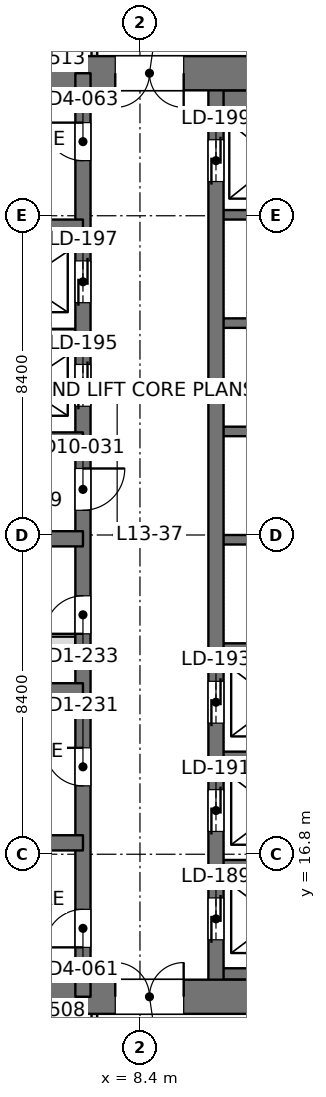
"""IFC4 building model, lengths in metres.
Left out: names, types, materials, properties, quantities, classifications, styles, units other than length and angle.
Written with IfcOpenShell. Run it as: python <this file> out.ifc"""

import sys

from ifc_helpers import new_model, si_unit, direction, frame, frame_2d, origin, place, context, subcontext, project, spatial, rectangle, extrude, element, fill, save


model = new_model("IFC4")
c1 = context("Model", 3, precision=1e-05, world=origin(), true_north=direction((0.0, 1.0)))
c2 = subcontext(c1, "Body", "Model", "MODEL_VIEW")
j1 = project(units=[si_unit("LENGTHUNIT", "METRE"), si_unit("PLANEANGLEUNIT", "RADIAN")], contexts=[c1])
p1 = place(None, origin())
s1 = spatial("IfcSite", under=j1, at=p1, CompositionType="ELEMENT")
p2 = place(p1, origin())
s2 = spatial("IfcBuilding", under=s1, at=p2, CompositionType="ELEMENT")
p3 = place(p2, frame((0.0, 0.0, 59.4)))
s3 = spatial("IfcBuildingStorey", under=s2, at=p3, CompositionType="ELEMENT", Elevation=59.4)
p4 = place(p3, frame((-1.2, 13.05, 0.0), z_axis=(0.0, 0.0, 1.0), x_axis=(1.0, 0.0, 0.0)))
e1 = element("IfcWall", 1, at=p4, inside=s3, PredefinedType="SHEAR", context=c2, shape_type="SweptSolid", body=[
    extrude(rectangle(XDim=18.0, YDim=0.9, at=frame_2d((9.0, 0.0))), origin(), (0.0, 0.0, 1.0), 4.5),
])
p5 = place(p4, frame((8.95, 0.0, 0.0)))
e2 = element("IfcOpeningElement", 2, at=p5, cuts=e1, PredefinedType="OPENING", context=c2, shape_type="SweptSolid", body=[
    extrude(rectangle(XDim=1.8, YDim=2.4, at=frame_2d((0.9, 1.2))), frame((0.0, 0.46, 0.0), z_axis=(0.0, -1.0, 0.0), x_axis=(1.0, 0.0, 0.0)), (0.0, 0.0, 1.0), 0.92),
])
p6 = place(p3, frame((-1.2, 37.35, 0.0), z_axis=(0.0, 0.0, 1.0), x_axis=(1.0, 0.0, 0.0)))
e3 = element("IfcWall", 3, at=p6, inside=s3, PredefinedType="SHEAR", context=c2, shape_type="SweptSolid", body=[
    extrude(rectangle(XDim=18.0, YDim=0.9, at=frame_2d((9.0, 0.0))), origin(), (0.0, 0.0, 1.0), 4.5),
])
p7 = place(p6, frame((8.95, 0.0, 0.0)))
e4 = element("IfcOpeningElement", 4, at=p7, cuts=e3, PredefinedType="OPENING", context=c2, shape_type="SweptSolid", body=[
    extrude(rectangle(XDim=1.8, YDim=2.4, at=frame_2d((0.9, 1.2))), frame((0.0, 0.46, 0.0), z_axis=(0.0, -1.0, 0.0), x_axis=(1.0, 0.0, 0.0)), (0.0, 0.0, 1.0), 0.92),
])
p8 = place(p3, frame((6.9, 13.05, 0.0), z_axis=(0.0, 0.0, 1.0), x_axis=(0.0, 1.0, 0.0)))
e5 = element("IfcWall", 5, at=p8, inside=s3, PredefinedType="SHEAR", context=c2, shape_type="SweptSolid", body=[
    extrude(rectangle(XDim=24.3, YDim=0.4, at=frame_2d((12.15, 0.0))), origin(), (0.0, 0.0, 1.0), 4.5),
])
p9 = place(p8, frame((1.3, 0.0, 0.0)))
e6 = element("IfcOpeningElement", 6, at=p9, cuts=e5, PredefinedType="OPENING", context=c2, shape_type="SweptSolid", body=[
    extrude(rectangle(XDim=1.0, YDim=2.2, at=frame_2d((0.5, 1.1))), frame((0.0, 0.21, 0.0), z_axis=(0.0, -1.0, 0.0), x_axis=(1.0, 0.0, 0.0)), (0.0, 0.0, 1.0), 0.42),
])
p10 = place(p8, frame((22.0, 0.0, 0.0)))
e7 = element("IfcOpeningElement", 7, at=p10, cuts=e5, PredefinedType="OPENING", context=c2, shape_type="SweptSolid", body=[
    extrude(rectangle(XDim=1.0, YDim=2.2, at=frame_2d((0.5, 1.1))), frame((0.0, 0.21, 0.0), z_axis=(0.0, -1.0, 0.0), x_axis=(1.0, 0.0, 0.0)), (0.0, 0.0, 1.0), 0.42),
])
p11 = place(p8, frame((5.55, 0.0, 0.0)))
e8 = element("IfcOpeningElement", 8, at=p11, cuts=e5, PredefinedType="OPENING", context=c2, shape_type="SweptSolid", body=[
    extrude(rectangle(XDim=1.0, YDim=2.2, at=frame_2d((0.5, 1.1))), frame((0.0, 0.21, 0.0), z_axis=(0.0, -1.0, 0.0), x_axis=(1.0, 0.0, 0.0)), (0.0, 0.0, 1.0), 0.42),
])
p12 = place(p8, frame((9.55, 0.0, 0.0)))
e9 = element("IfcOpeningElement", 9, at=p12, cuts=e5, PredefinedType="OPENING", context=c2, shape_type="SweptSolid", body=[
    extrude(rectangle(XDim=1.0, YDim=2.2, at=frame_2d((0.5, 1.1))), frame((0.0, 0.21, 0.0), z_axis=(0.0, -1.0, 0.0), x_axis=(1.0, 0.0, 0.0)), (0.0, 0.0, 1.0), 0.42),
])
p13 = place(p8, frame((12.8, 0.0, 0.0)))
e10 = element("IfcOpeningElement", 10, at=p13, cuts=e5, PredefinedType="OPENING", context=c2, shape_type="SweptSolid", body=[
    extrude(rectangle(XDim=1.1, YDim=2.2, at=frame_2d((0.55, 1.1))), frame((0.0, 0.21, 0.0), z_axis=(0.0, -1.0, 0.0), x_axis=(1.0, 0.0, 0.0)), (0.0, 0.0, 1.0), 0.42),
])
p14 = place(p8, frame((15.538, 0.0, 0.0)))
e11 = element("IfcOpeningElement", 11, at=p14, cuts=e5, PredefinedType="OPENING", context=c2, shape_type="SweptSolid", body=[
    extrude(rectangle(XDim=1.1, YDim=2.2, at=frame_2d((0.55, 1.1))), frame((0.0, 0.21, 0.0), z_axis=(0.0, -1.0, 0.0), x_axis=(1.0, 0.0, 0.0)), (0.0, 0.0, 1.0), 0.42),
])
p15 = place(p8, frame((18.262, 0.0, 0.0)))
e12 = element("IfcOpeningElement", 12, at=p15, cuts=e5, PredefinedType="OPENING", context=c2, shape_type="SweptSolid", body=[
    extrude(rectangle(XDim=1.1, YDim=2.2, at=frame_2d((0.55, 1.1))), frame((0.0, 0.21, 0.0), z_axis=(0.0, -1.0, 0.0), x_axis=(1.0, 0.0, 0.0)), (0.0, 0.0, 1.0), 0.42),
])
p16 = place(p3, frame((10.4, 13.05, 0.0), z_axis=(0.0, 0.0, 1.0), x_axis=(0.0, 1.0, 0.0)))
e13 = element("IfcWall", 13, at=p16, inside=s3, PredefinedType="SHEAR", context=c2, shape_type="SweptSolid", body=[
    extrude(rectangle(XDim=24.3, YDim=0.4, at=frame_2d((12.15, 0.0))), origin(), (0.0, 0.0, 1.0), 4.5),
])
p17 = place(p16, frame((1.5, 0.0, 0.0)))
e14 = element("IfcOpeningElement", 14, at=p17, cuts=e13, PredefinedType="OPENING", context=c2, shape_type="SweptSolid", body=[
    extrude(rectangle(XDim=1.1, YDim=2.2, at=frame_2d((0.55, 1.1))), frame((0.0, 0.21, 0.0), z_axis=(0.0, -1.0, 0.0), x_axis=(1.0, 0.0, 0.0)), (0.0, 0.0, 1.0), 0.42),
])
p18 = place(p16, frame((4.35, 0.0, 0.0)))
e15 = element("IfcOpeningElement", 15, at=p18, cuts=e13, PredefinedType="OPENING", context=c2, shape_type="SweptSolid", body=[
    extrude(rectangle(XDim=1.1, YDim=2.2, at=frame_2d((0.55, 1.1))), frame((0.0, 0.21, 0.0), z_axis=(0.0, -1.0, 0.0), x_axis=(1.0, 0.0, 0.0)), (0.0, 0.0, 1.0), 0.42),
])
p19 = place(p16, frame((7.2, 0.0, 0.0)))
e16 = element("IfcOpeningElement", 16, at=p19, cuts=e13, PredefinedType="OPENING", context=c2, shape_type="SweptSolid", body=[
    extrude(rectangle(XDim=1.1, YDim=2.2, at=frame_2d((0.55, 1.1))), frame((0.0, 0.21, 0.0), z_axis=(0.0, -1.0, 0.0), x_axis=(1.0, 0.0, 0.0)), (0.0, 0.0, 1.0), 0.42),
])
p20 = place(p16, frame((21.45, 0.0, 0.0)))
e17 = element("IfcOpeningElement", 17, at=p20, cuts=e13, PredefinedType="OPENING", context=c2, shape_type="SweptSolid", body=[
    extrude(rectangle(XDim=1.1, YDim=2.2, at=frame_2d((0.55, 1.1))), frame((0.0, 0.21, 0.0), z_axis=(0.0, -1.0, 0.0), x_axis=(1.0, 0.0, 0.0)), (0.0, 0.0, 1.0), 0.42),
])
for number, where, z_axis, x_axis in (
    (18, (-0.75, 17.1, 0.0), (0.0, 0.0, 1.0), (1.0, 0.0, 0.0)),
    (19, (-0.75, 21.1, 0.0), (0.0, 0.0, 1.0), (1.0, 0.0, 0.0)),
    (20, (-0.75, 25.1, 0.0), (0.0, 0.0, 1.0), (1.0, 0.0, 0.0)),
    (21, (-0.75, 27.7, 0.0), (0.0, 0.0, 1.0), (1.0, 0.0, 0.0)),
    (22, (-0.75, 33.3, 0.0), (0.0, 0.0, 1.0), (1.0, 0.0, 0.0)),
):
    element("IfcWall", number, at=place(p3, frame(where, z_axis=z_axis, x_axis=x_axis)), inside=s3, PredefinedType="SHEAR", context=c2, shape_type="SweptSolid", body=[
        extrude(rectangle(XDim=7.65, YDim=0.4, at=frame_2d((3.825, 0.0))), origin(), (0.0, 0.0, 1.0), 4.5),
    ])
p21 = place(p3, frame((3.7, 30.5, 0.0), z_axis=(0.0, 0.0, 1.0), x_axis=(1.0, 0.0, 0.0)))
e23 = element("IfcWall", 23, at=p21, inside=s3, PredefinedType="SHEAR", context=c2, shape_type="SweptSolid", body=[
    extrude(rectangle(XDim=3.2, YDim=0.25, at=frame_2d((1.6, 0.0))), origin(), (0.0, 0.0, 1.0), 4.5),
])
p22 = place(p3, frame((10.4, 13.65, 0.0), z_axis=(0.0, 0.0, 1.0), x_axis=(1.0, 0.0, 0.0)))
e24 = element("IfcWall", 24, at=p22, inside=s3, PredefinedType="SHEAR", context=c2, shape_type="SweptSolid", body=[
    extrude(rectangle(XDim=3.2, YDim=0.3, at=frame_2d((1.6, 0.0))), origin(), (0.0, 0.0, 1.0), 4.5),
])
for number, where, z_axis, x_axis in (
    (25, (10.4, 16.525, 0.0), (0.0, 0.0, 1.0), (1.0, 0.0, 0.0)),
    (26, (10.4, 19.375, 0.0), (0.0, 0.0, 1.0), (1.0, 0.0, 0.0)),
    (27, (10.4, 22.225, 0.0), (0.0, 0.0, 1.0), (1.0, 0.0, 0.0)),
    (28, (10.4, 25.075, 0.0), (0.0, 0.0, 1.0), (1.0, 0.0, 0.0)),
    (29, (10.4, 27.925, 0.0), (0.0, 0.0, 1.0), (1.0, 0.0, 0.0)),
    (30, (10.4, 30.775, 0.0), (0.0, 0.0, 1.0), (1.0, 0.0, 0.0)),
    (31, (10.4, 33.625, 0.0), (0.0, 0.0, 1.0), (1.0, 0.0, 0.0)),
):
    element("IfcWall", number, at=place(p3, frame(where, z_axis=z_axis, x_axis=x_axis)), inside=s3, PredefinedType="SHEAR", context=c2, shape_type="SweptSolid", body=[
        extrude(rectangle(XDim=3.2, YDim=0.25, at=frame_2d((1.6, 0.0))), origin(), (0.0, 0.0, 1.0), 4.5),
    ])
p23 = place(p3, frame((10.4, 36.625, 0.0), z_axis=(0.0, 0.0, 1.0), x_axis=(1.0, 0.0, 0.0)))
e32 = element("IfcWall", 32, at=p23, inside=s3, PredefinedType="SHEAR", context=c2, shape_type="SweptSolid", body=[
    extrude(rectangle(XDim=3.2, YDim=0.55, at=frame_2d((1.6, 0.0))), origin(), (0.0, 0.0, 1.0), 4.5),
])
p24 = place(p3, frame((7.2, 10.474, 0.0), z_axis=(0.0, 0.0, 1.0), x_axis=(0.0, 1.0, 0.0)))
e33 = element("IfcWall", 33, at=p24, inside=s3, PredefinedType="PARTITIONING", context=c2, shape_type="SweptSolid", body=[
    extrude(rectangle(XDim=2.128, YDim=0.15, at=frame_2d((1.064, 0.0))), origin(), (0.0, 0.0, 1.0), 4.34),
])
p25 = place(p24, frame((0.526, 0.0, 0.0)))
e34 = element("IfcOpeningElement", 34, at=p25, cuts=e33, PredefinedType="OPENING", context=c2, shape_type="SweptSolid", body=[
    extrude(rectangle(XDim=1.0, YDim=2.2, at=frame_2d((0.5, 1.1))), frame((0.0, 0.085, 0.0), z_axis=(0.0, -1.0, 0.0), x_axis=(1.0, 0.0, 0.0)), (0.0, 0.0, 1.0), 0.17),
])
p26 = place(p3, frame((7.2, 37.8, 0.0), z_axis=(0.0, 0.0, 1.0), x_axis=(0.0, 1.0, 0.0)))
e35 = element("IfcWall", 35, at=p26, inside=s3, PredefinedType="PARTITIONING", context=c2, shape_type="SweptSolid", body=[
    extrude(rectangle(XDim=2.126, YDim=0.15, at=frame_2d((1.063, 0.0))), origin(), (0.0, 0.0, 1.0), 4.34),
])
p27 = place(p26, frame((0.6, 0.0, 0.0)))
e36 = element("IfcOpeningElement", 36, at=p27, cuts=e35, PredefinedType="OPENING", context=c2, shape_type="SweptSolid", body=[
    extrude(rectangle(XDim=1.0, YDim=2.2, at=frame_2d((0.5, 1.1))), frame((0.0, 0.085, 0.0), z_axis=(0.0, -1.0, 0.0), x_axis=(1.0, 0.0, 0.0)), (0.0, 0.0, 1.0), 0.17),
])
p28 = place(p3, frame((0.1, 22.4, 0.0), z_axis=(0.0, 0.0, 1.0), x_axis=(1.0, 0.0, 0.0)))
e37 = element("IfcWall", 37, at=p28, inside=s3, PredefinedType="PARTITIONING", context=c2, shape_type="SweptSolid", body=[
    extrude(rectangle(XDim=6.6, YDim=0.25, at=frame_2d((3.3, 0.0))), origin(), (0.0, 0.0, 1.0), 4.3),
])
p29 = place(p28, frame((2.875, 0.0, 0.0)))
e38 = element("IfcOpeningElement", 38, at=p29, cuts=e37, PredefinedType="OPENING", context=c2, shape_type="SweptSolid", body=[
    extrude(rectangle(XDim=0.9, YDim=2.2, at=frame_2d((0.45, 1.1))), frame((0.0, 0.135, 0.0), z_axis=(0.0, -1.0, 0.0), x_axis=(1.0, 0.0, 0.0)), (0.0, 0.0, 1.0), 0.27),
])
p30 = place(p5, origin())
e39 = element("IfcDoor", 39, at=p30, inside=s3, OperationType="DOUBLE_DOOR_SINGLE_SWING", PredefinedType="DOOR", context=c2, shape_type="SweptSolid", body=[
    extrude(rectangle(XDim=1.8, YDim=2.4, at=frame_2d((0.9, 1.2))), frame((0.0, 0.025, 0.0), z_axis=(0.0, -1.0, 0.0), x_axis=(1.0, 0.0, 0.0)), (0.0, 0.0, 1.0), 0.05),
])
fill(e2, e39)
p31 = place(p7, frame((1.8, 0.0, 0.0), z_axis=(0.0, 0.0, 1.0), x_axis=(-1.0, 0.0, 0.0)))
e40 = element("IfcDoor", 40, at=p31, inside=s3, OperationType="DOUBLE_DOOR_SINGLE_SWING", PredefinedType="DOOR", context=c2, shape_type="SweptSolid", body=[
    extrude(rectangle(XDim=1.8, YDim=2.4, at=frame_2d((0.9, 1.2))), frame((0.0, 0.025, 0.0), z_axis=(0.0, -1.0, 0.0), x_axis=(1.0, 0.0, 0.0)), (0.0, 0.0, 1.0), 0.05),
])
fill(e4, e40)
p32 = place(p9, origin())
e41 = element("IfcDoor", 41, at=p32, inside=s3, OperationType="SINGLE_SWING_LEFT", PredefinedType="DOOR", context=c2, shape_type="SweptSolid", body=[
    extrude(rectangle(XDim=1.0, YDim=2.2, at=frame_2d((0.5, 1.1))), frame((0.0, 0.025, 0.0), z_axis=(0.0, -1.0, 0.0), x_axis=(1.0, 0.0, 0.0)), (0.0, 0.0, 1.0), 0.05),
])
fill(e6, e41)
p33 = place(p10, origin())
e42 = element("IfcDoor", 42, at=p33, inside=s3, OperationType="SINGLE_SWING_RIGHT", PredefinedType="DOOR", context=c2, shape_type="SweptSolid", body=[
    extrude(rectangle(XDim=1.0, YDim=2.2, at=frame_2d((0.5, 1.1))), frame((0.0, 0.025, 0.0), z_axis=(0.0, -1.0, 0.0), x_axis=(1.0, 0.0, 0.0)), (0.0, 0.0, 1.0), 0.05),
])
fill(e7, e42)
p34 = place(p11, origin())
e43 = element("IfcDoor", 43, at=p34, inside=s3, OperationType="SINGLE_SWING_RIGHT", PredefinedType="DOOR", context=c2, shape_type="SweptSolid", body=[
    extrude(rectangle(XDim=1.0, YDim=2.2, at=frame_2d((0.5, 1.1))), frame((0.0, 0.025, 0.0), z_axis=(0.0, -1.0, 0.0), x_axis=(1.0, 0.0, 0.0)), (0.0, 0.0, 1.0), 0.05),
])
fill(e8, e43)
p35 = place(p12, origin())
e44 = element("IfcDoor", 44, at=p35, inside=s3, OperationType="SINGLE_SWING_LEFT", PredefinedType="DOOR", context=c2, shape_type="SweptSolid", body=[
    extrude(rectangle(XDim=1.0, YDim=2.2, at=frame_2d((0.5, 1.1))), frame((0.0, 0.025, 0.0), z_axis=(0.0, -1.0, 0.0), x_axis=(1.0, 0.0, 0.0)), (0.0, 0.0, 1.0), 0.05),
])
fill(e9, e44)
p36 = place(p13, frame((1.1, 0.0, 0.0), z_axis=(0.0, 0.0, 1.0), x_axis=(-1.0, 0.0, 0.0)))
e45 = element("IfcDoor", 45, at=p36, inside=s3, OperationType="SINGLE_SWING_LEFT", PredefinedType="DOOR", context=c2, shape_type="SweptSolid", body=[
    extrude(rectangle(XDim=1.1, YDim=2.2, at=frame_2d((0.55, 1.1))), frame((0.0, 0.025, 0.0), z_axis=(0.0, -1.0, 0.0), x_axis=(1.0, 0.0, 0.0)), (0.0, 0.0, 1.0), 0.05),
])
fill(e10, e45)
p37 = place(p17, origin())
e46 = element("IfcDoor", 46, at=p37, inside=s3, OperationType="DOUBLE_DOOR_SLIDING", PredefinedType="DOOR", context=c2, shape_type="SweptSolid", body=[
    extrude(rectangle(XDim=1.1, YDim=2.2, at=frame_2d((0.55, 1.1))), frame((0.0, 0.025, 0.0), z_axis=(0.0, -1.0, 0.0), x_axis=(1.0, 0.0, 0.0)), (0.0, 0.0, 1.0), 0.05),
])
fill(e14, e46)
p38 = place(p18, origin())
e47 = element("IfcDoor", 47, at=p38, inside=s3, OperationType="DOUBLE_DOOR_SLIDING", PredefinedType="DOOR", context=c2, shape_type="SweptSolid", body=[
    extrude(rectangle(XDim=1.1, YDim=2.2, at=frame_2d((0.55, 1.1))), frame((0.0, 0.025, 0.0), z_axis=(0.0, -1.0, 0.0), x_axis=(1.0, 0.0, 0.0)), (0.0, 0.0, 1.0), 0.05),
])
fill(e15, e47)
p39 = place(p19, origin())
e48 = element("IfcDoor", 48, at=p39, inside=s3, OperationType="DOUBLE_DOOR_SLIDING", PredefinedType="DOOR", context=c2, shape_type="SweptSolid", body=[
    extrude(rectangle(XDim=1.1, YDim=2.2, at=frame_2d((0.55, 1.1))), frame((0.0, 0.025, 0.0), z_axis=(0.0, -1.0, 0.0), x_axis=(1.0, 0.0, 0.0)), (0.0, 0.0, 1.0), 0.05),
])
fill(e16, e48)
p40 = place(p20, origin())
e49 = element("IfcDoor", 49, at=p40, inside=s3, OperationType="DOUBLE_DOOR_SLIDING", PredefinedType="DOOR", context=c2, shape_type="SweptSolid", body=[
    extrude(rectangle(XDim=1.1, YDim=2.2, at=frame_2d((0.55, 1.1))), frame((0.0, 0.025, 0.0), z_axis=(0.0, -1.0, 0.0), x_axis=(1.0, 0.0, 0.0)), (0.0, 0.0, 1.0), 0.05),
])
fill(e17, e49)
p41 = place(p14, origin())
e50 = element("IfcDoor", 50, at=p41, inside=s3, OperationType="DOUBLE_DOOR_SLIDING", PredefinedType="DOOR", context=c2, shape_type="SweptSolid", body=[
    extrude(rectangle(XDim=1.1, YDim=2.2, at=frame_2d((0.55, 1.1))), frame((0.0, 0.025, 0.0), z_axis=(0.0, -1.0, 0.0), x_axis=(1.0, 0.0, 0.0)), (0.0, 0.0, 1.0), 0.05),
])
fill(e11, e50)
p42 = place(p15, origin())
e51 = element("IfcDoor", 51, at=p42, inside=s3, OperationType="DOUBLE_DOOR_SLIDING", PredefinedType="DOOR", context=c2, shape_type="SweptSolid", body=[
    extrude(rectangle(XDim=1.1, YDim=2.2, at=frame_2d((0.55, 1.1))), frame((0.0, 0.025, 0.0), z_axis=(0.0, -1.0, 0.0), x_axis=(1.0, 0.0, 0.0)), (0.0, 0.0, 1.0), 0.05),
])
fill(e12, e51)
save(model, sys.argv[1])
